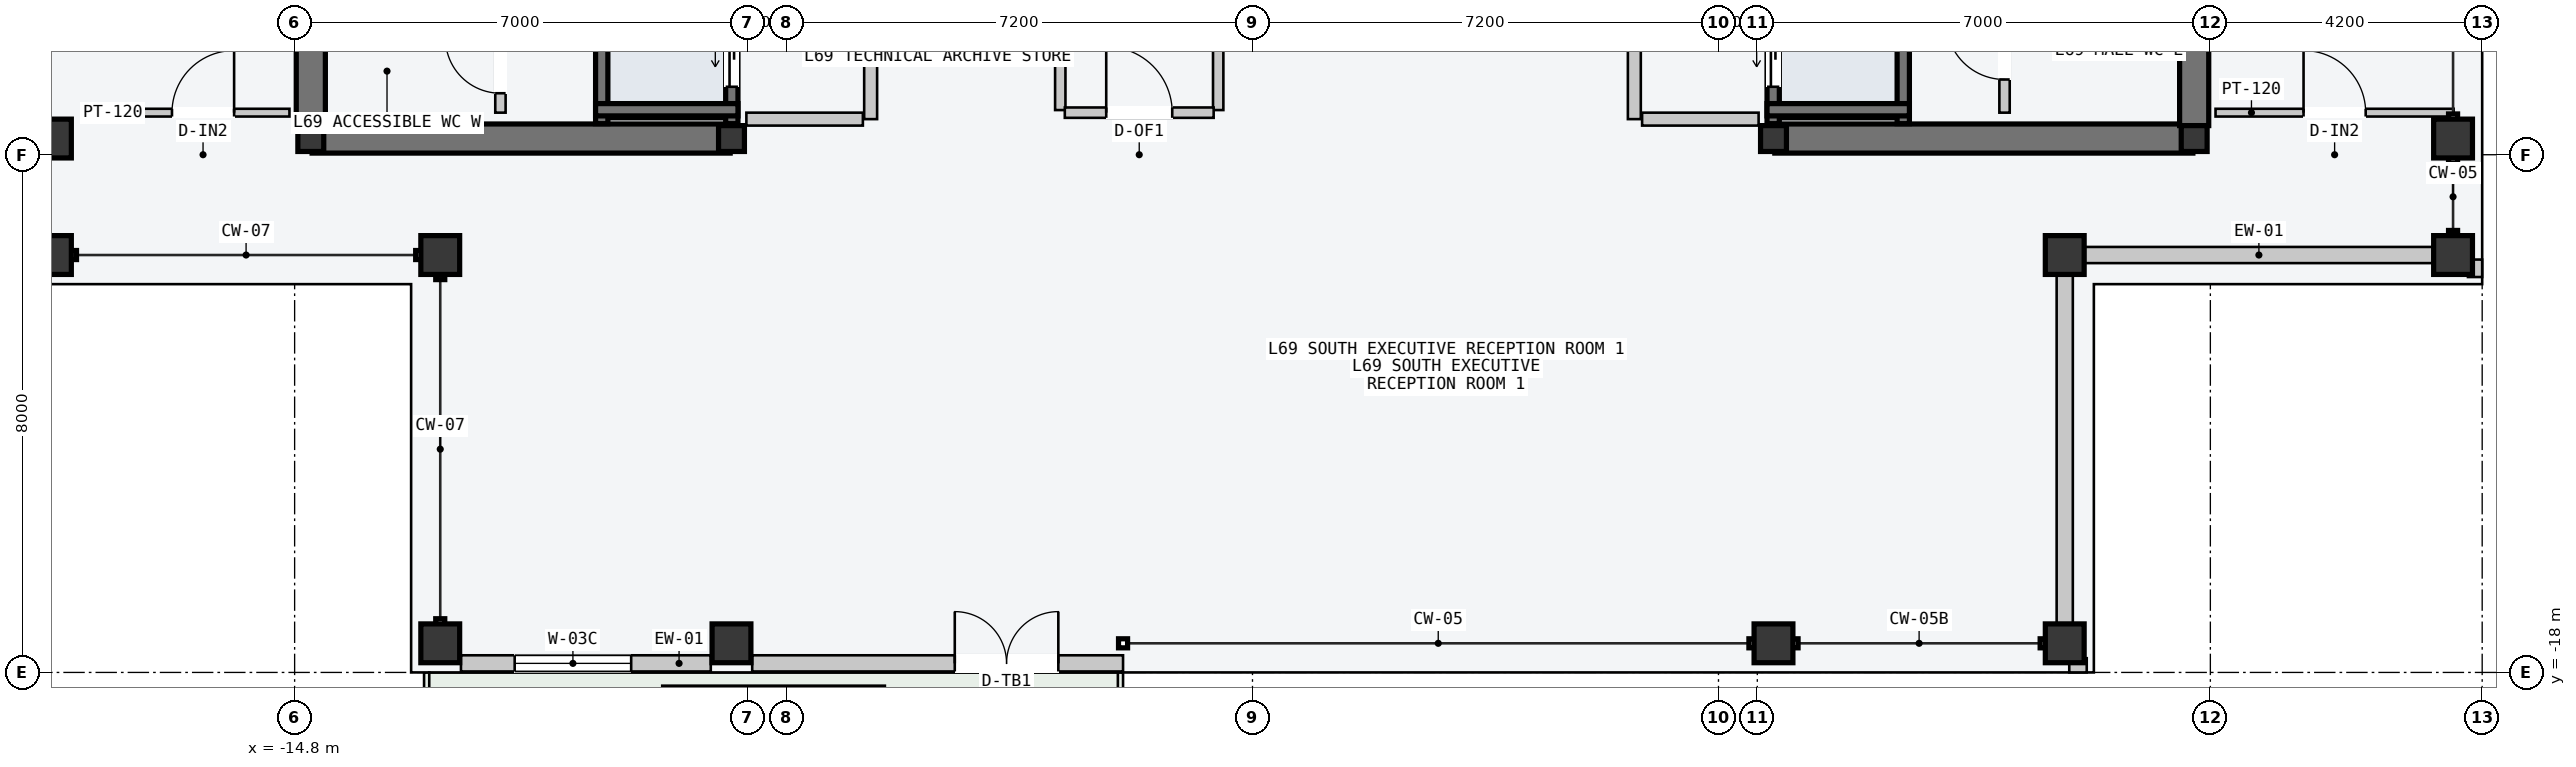
"""IFC4 building model, lengths in metres.
Left out: names, types, materials, properties, quantities, classifications, styles, units other than length and angle.
Written with IfcOpenShell. Run it as: python <this file> out.ifc"""

import sys

from ifc_helpers import new_model, si_unit, direction, frame, frame_2d, origin, origin_2d, place, context, subcontext, project, spatial, rectangle, hollow_rectangle, i_section, extrude, element, fill, save


model = new_model("IFC4")
c1 = context("Model", 3, precision=1e-05, world=origin(), true_north=direction((0.0, 1.0)))
c2 = subcontext(c1, "Body", "Model", "MODEL_VIEW")
j1 = project(units=[si_unit("LENGTHUNIT", "METRE"), si_unit("PLANEANGLEUNIT", "RADIAN")], contexts=[c1])
p1 = place(None, origin())
s1 = spatial("IfcSite", under=j1, at=p1, CompositionType="ELEMENT")
p2 = place(p1, origin())
s2 = spatial("IfcBuilding", under=s1, at=p2, CompositionType="ELEMENT")
p3 = place(p2, frame((0.0, 0.0, 261.6)))
s3 = spatial("IfcBuildingStorey", under=s2, at=p3, CompositionType="ELEMENT", Elevation=261.6)
p4 = place(p3, frame((-14.53, -9.75, -0.2), z_axis=(0.0, 0.0, 1.0), x_axis=(1.0, 0.0, 0.0)))
e1 = element("IfcWall", 1, at=p4, inside=s3, PredefinedType="SHEAR", context=c2, shape_type="SweptSolid", body=[
    extrude(rectangle(XDim=6.46, YDim=0.45, at=frame_2d((3.23, 0.0))), origin(), (0.0, 0.0, 1.0), 3.6),
])
p5 = place(p3, frame((-14.55, -9.55, -0.2), z_axis=(0.0, 0.0, 1.0), x_axis=(0.0, 1.0, 0.0)))
e2 = element("IfcWall", 2, at=p5, inside=s3, PredefinedType="SHEAR", context=c2, shape_type="SweptSolid", body=[
    extrude(rectangle(XDim=9.35, YDim=0.45, at=frame_2d((4.675, 0.0))), origin(), (0.0, 0.0, 1.0), 3.6),
])
p6 = place(p3, frame((8.07, -9.75, -0.2), z_axis=(0.0, 0.0, 1.0), x_axis=(1.0, 0.0, 0.0)))
e3 = element("IfcWall", 3, at=p6, inside=s3, PredefinedType="SHEAR", context=c2, shape_type="SweptSolid", body=[
    extrude(rectangle(XDim=6.46, YDim=0.45, at=frame_2d((3.23, 0.0))), origin(), (0.0, 0.0, 1.0), 3.6),
])
p7 = place(p3, frame((14.55, -9.55, -0.2), z_axis=(0.0, 0.0, 1.0), x_axis=(0.0, 1.0, 0.0)))
e4 = element("IfcWall", 4, at=p7, inside=s3, PredefinedType="SHEAR", context=c2, shape_type="SweptSolid", body=[
    extrude(rectangle(XDim=9.35, YDim=0.45, at=frame_2d((4.675, 0.0))), origin(), (0.0, 0.0, 1.0), 3.6),
])
for number, where, z_axis, x_axis in (
    (5, (-14.55, -9.75, 0.0), (0.0, 0.0, 1.0), (1.0, 0.0, 0.0)),
    (6, (-8.05, -9.75, 0.0), (0.0, 0.0, 1.0), (1.0, 0.0, 0.0)),
    (7, (8.05, -9.75, 0.0), (0.0, 0.0, 1.0), (1.0, 0.0, 0.0)),
    (8, (14.55, -9.75, 0.0), (0.0, 0.0, 1.0), (1.0, 0.0, 0.0)),
):
    element("IfcColumn", number, at=place(p3, frame(where, z_axis=z_axis, x_axis=x_axis)), inside=s3, PredefinedType="COLUMN", context=c2, shape_type="SweptSolid", body=[
        extrude(i_section(OverallWidth=0.4, OverallDepth=0.4, WebThickness=0.013, FlangeThickness=0.021, at=origin_2d()), origin(), (0.0, 0.0, 1.0), 3.6),
    ])
for number, where, z_axis, x_axis in (
    (9, (-12.55, -17.55, 0.0), (0.0, 0.0, 1.0), (1.0, 0.0, 0.0)),
    (10, (-8.05, -17.55, 0.0), (0.0, 0.0, 1.0), (1.0, 0.0, 0.0)),
    (11, (8.05, -17.55, 0.0), (0.0, 0.0, 1.0), (1.0, 0.0, 0.0)),
    (12, (12.55, -17.55, 0.0), (0.0, 0.0, 1.0), (1.0, 0.0, 0.0)),
    (13, (-18.55, -11.55, 0.0), (0.0, 0.0, 1.0), (0.0, 1.0, 0.0)),
    (14, (-18.55, -9.75, 0.0), (0.0, 0.0, 1.0), (0.0, 1.0, 0.0)),
    (15, (18.55, -11.55, 0.0), (0.0, 0.0, 1.0), (0.0, 1.0, 0.0)),
    (16, (18.55, -9.75, 0.0), (0.0, 0.0, 1.0), (0.0, 1.0, 0.0)),
    (17, (12.55, -11.55, 0.0), (0.0, 0.0, 1.0), (1.0, 0.0, 0.0)),
    (18, (-12.55, -11.55, 0.0), (0.0, 0.0, 1.0), (1.0, 0.0, 0.0)),
):
    element("IfcColumn", number, at=place(p3, frame(where, z_axis=z_axis, x_axis=x_axis)), inside=s3, PredefinedType="COLUMN", context=c2, shape_type="SweptSolid", body=[
        extrude(hollow_rectangle(XDim=0.6, YDim=0.6, WallThickness=0.025, at=origin_2d()), origin(), (0.0, 0.0, 1.0), 3.6),
    ])
p8 = place(p3, frame((-12.23, -17.86, 0.0), z_axis=(0.0, 0.0, 1.0), x_axis=(1.0, 0.0, 0.0)))
e19 = element("IfcWall", 19, at=p8, inside=s3, PredefinedType="STANDARD", context=c2, shape_type="SweptSolid", body=[
    extrude(rectangle(XDim=3.86, YDim=0.25, at=frame_2d((1.93, 0.0))), origin(), (0.0, 0.0, 1.0), 3.4),
])
p9 = place(p8, frame((0.83, 0.0, 0.85)))
e20 = element("IfcOpeningElement", 20, at=p9, cuts=e19, PredefinedType="OPENING", context=c2, shape_type="SweptSolid", body=[
    extrude(rectangle(XDim=1.8, YDim=2.05, at=frame_2d((0.9, 1.025))), frame((0.0, 0.135, 0.0), z_axis=(0.0, -1.0, 0.0), x_axis=(1.0, 0.0, 0.0)), (0.0, 0.0, 1.0), 0.27),
])
p10 = place(p3, frame((-7.73, -17.86, 0.0), z_axis=(0.0, 0.0, 1.0), x_axis=(1.0, 0.0, 0.0)))
e21 = element("IfcWall", 21, at=p10, inside=s3, PredefinedType="STANDARD", context=c2, shape_type="SweptSolid", body=[
    extrude(rectangle(XDim=5.73, YDim=0.25, at=frame_2d((2.865, 0.0))), origin(), (0.0, 0.0, 1.0), 3.4),
])
p11 = place(p10, frame((3.13, 0.0, 0.0)))
e22 = element("IfcOpeningElement", 22, at=p11, cuts=e21, PredefinedType="OPENING", context=c2, shape_type="SweptSolid", body=[
    extrude(rectangle(XDim=1.6, YDim=2.2, at=frame_2d((0.8, 1.1))), frame((0.0, 0.135, 0.0), z_axis=(0.0, -1.0, 0.0), x_axis=(1.0, 0.0, 0.0)), (0.0, 0.0, 1.0), 0.27),
])
for number, where, z_axis, x_axis in (
    (23, (12.86, -11.55, 0.0), (0.0, 0.0, 1.0), (1.0, 0.0, 0.0)),
    (24, (12.55, -17.24, 0.0), (0.0, 0.0, 1.0), (0.0, 1.0, 0.0)),
):
    element("IfcWall", number, at=place(p3, frame(where, z_axis=z_axis, x_axis=x_axis)), inside=s3, PredefinedType="STANDARD", context=c2, shape_type="SweptSolid", body=[
        extrude(rectangle(XDim=5.38, YDim=0.25, at=frame_2d((2.69, 0.0))), origin(), (0.0, 0.0, 1.0), 2.85),
    ])
for number, where, z_axis, x_axis in (
    (25, (12.62, -17.89, 0.0), (0.0, 0.0, 1.0), (1.0, 0.0, 0.0)),
    (26, (18.89, -11.89, 0.0), (0.0, 0.0, 1.0), (0.0, 1.0, 0.0)),
):
    element("IfcWall", number, at=place(p3, frame(where, z_axis=z_axis, x_axis=x_axis)), inside=s3, PredefinedType="PARAPET", context=c2, shape_type="SweptSolid", body=[
        extrude(rectangle(XDim=0.27, YDim=0.22, at=frame_2d((0.135, 0.0))), origin(), (0.0, 0.0, 1.0), 1.2),
    ])
p12 = place(p3, frame((-8.045, -9.52, -0.2), z_axis=(0.0, 0.0, 1.0), x_axis=(0.0, 1.0, 0.0)))
e27 = element("IfcWall", 27, at=p12, inside=s3, PredefinedType="SOLIDWALL", context=c2, shape_type="SweptSolid", body=[
    extrude(rectangle(XDim=2.12, YDim=0.19, at=frame_2d((1.06, 0.0))), origin(), (0.0, 0.0, 1.0), 3.6),
])
p13 = place(p12, frame((0.57, 0.0, 0.2)))
e28 = element("IfcOpeningElement", 28, at=p13, cuts=e27, PredefinedType="OPENING", context=c2, shape_type="SweptSolid", body=[
    extrude(rectangle(XDim=1.1, YDim=2.2, at=frame_2d((0.55, 1.1))), frame((0.0, 0.105, 0.0), z_axis=(0.0, -1.0, 0.0), x_axis=(1.0, 0.0, 0.0)), (0.0, 0.0, 1.0), 0.21),
])
p14 = place(p3, frame((-10.055, -9.52, -0.2), z_axis=(0.0, 0.0, 1.0), x_axis=(0.0, 1.0, 0.0)))
e29 = element("IfcWall", 29, at=p14, inside=s3, PredefinedType="SOLIDWALL", context=c2, shape_type="SweptSolid", body=[
    extrude(rectangle(XDim=2.12, YDim=0.19, at=frame_2d((1.06, 0.0))), origin(), (0.0, 0.0, 1.0), 3.6),
])
p15 = place(p3, frame((-10.15, -9.305, -0.2), z_axis=(0.0, 0.0, 1.0), x_axis=(1.0, 0.0, 0.0)))
e30 = element("IfcWall", 30, at=p15, inside=s3, PredefinedType="SOLIDWALL", context=c2, shape_type="SweptSolid", body=[
    extrude(rectangle(XDim=2.2, YDim=0.19, at=frame_2d((1.1, 0.0))), origin(), (0.0, 0.0, 1.0), 3.6),
])
p16 = place(p3, frame((8.045, -9.52, -0.2), z_axis=(0.0, 0.0, 1.0), x_axis=(0.0, 1.0, 0.0)))
e31 = element("IfcWall", 31, at=p16, inside=s3, PredefinedType="SOLIDWALL", context=c2, shape_type="SweptSolid", body=[
    extrude(rectangle(XDim=2.12, YDim=0.19, at=frame_2d((1.06, 0.0))), origin(), (0.0, 0.0, 1.0), 3.6),
])
p17 = place(p16, frame((0.57, 0.0, 0.2)))
e32 = element("IfcOpeningElement", 32, at=p17, cuts=e31, PredefinedType="OPENING", context=c2, shape_type="SweptSolid", body=[
    extrude(rectangle(XDim=1.1, YDim=2.2, at=frame_2d((0.55, 1.1))), frame((0.0, 0.105, 0.0), z_axis=(0.0, -1.0, 0.0), x_axis=(1.0, 0.0, 0.0)), (0.0, 0.0, 1.0), 0.21),
])
p18 = place(p3, frame((10.055, -9.52, -0.2), z_axis=(0.0, 0.0, 1.0), x_axis=(0.0, 1.0, 0.0)))
e33 = element("IfcWall", 33, at=p18, inside=s3, PredefinedType="SOLIDWALL", context=c2, shape_type="SweptSolid", body=[
    extrude(rectangle(XDim=2.12, YDim=0.19, at=frame_2d((1.06, 0.0))), origin(), (0.0, 0.0, 1.0), 3.6),
])
p19 = place(p3, frame((7.95, -9.305, -0.2), z_axis=(0.0, 0.0, 1.0), x_axis=(1.0, 0.0, 0.0)))
e34 = element("IfcWall", 34, at=p19, inside=s3, PredefinedType="SOLIDWALL", context=c2, shape_type="SweptSolid", body=[
    extrude(rectangle(XDim=2.2, YDim=0.19, at=frame_2d((1.1, 0.0))), origin(), (0.0, 0.0, 1.0), 3.6),
])
p20 = place(p3, frame((-5.9, -9.45, 0.0), z_axis=(0.0, 0.0, 1.0), x_axis=(0.0, 1.0, 0.0)))
e35 = element("IfcWall", 35, at=p20, inside=s3, PredefinedType="PARTITIONING", context=c2, shape_type="SweptSolid", body=[
    extrude(rectangle(XDim=10.5, YDim=0.2, at=frame_2d((5.25, 0.0))), origin(), (0.0, 0.0, 1.0), 3.4),
])
p21 = place(p20, frame((3.9, 0.0, 0.0)))
e36 = element("IfcOpeningElement", 36, at=p21, cuts=e35, PredefinedType="OPENING", context=c2, shape_type="SweptSolid", body=[
    extrude(rectangle(XDim=1.5, YDim=2.2, at=frame_2d((0.75, 1.1))), frame((0.0, 0.11, 0.0), z_axis=(0.0, -1.0, 0.0), x_axis=(1.0, 0.0, 0.0)), (0.0, 0.0, 1.0), 0.22),
])
p22 = place(p3, frame((-6.02, -9.45, 0.0), z_axis=(0.0, 0.0, 1.0), x_axis=(-1.0, 0.0, 0.0)))
e37 = element("IfcWall", 37, at=p22, inside=s3, PredefinedType="PARTITIONING", context=c2, shape_type="SweptSolid", body=[
    extrude(rectangle(XDim=1.8, YDim=0.2, at=frame_2d((0.9, 0.0))), origin(), (0.0, 0.0, 1.0), 3.4),
])
p23 = place(p3, frame((-11.62, -9.35, 0.0), z_axis=(0.0, 0.0, 1.0), x_axis=(0.0, 1.0, 0.0)))
e38 = element("IfcWall", 38, at=p23, inside=s3, PredefinedType="PARTITIONING", context=c2, shape_type="SweptSolid", body=[
    extrude(rectangle(XDim=3.85, YDim=0.16, at=frame_2d((1.925, 0.0))), origin(), (0.0, 0.0, 1.0), 3.4),
])
p24 = place(p23, frame((0.3, 0.0, 0.0)))
e39 = element("IfcOpeningElement", 39, at=p24, cuts=e38, PredefinedType="OPENING", context=c2, shape_type="SweptSolid", body=[
    extrude(rectangle(XDim=0.85, YDim=2.12, at=frame_2d((0.425, 1.06))), frame((0.0, 0.09, 0.0), z_axis=(0.0, -1.0, 0.0), x_axis=(1.0, 0.0, 0.0)), (0.0, 0.0, 1.0), 0.18),
])
p25 = place(p23, frame((1.5, 0.0, 0.0)))
e40 = element("IfcOpeningElement", 40, at=p25, cuts=e38, PredefinedType="OPENING", context=c2, shape_type="SweptSolid", body=[
    extrude(rectangle(XDim=0.85, YDim=2.12, at=frame_2d((0.425, 1.06))), frame((0.0, 0.09, 0.0), z_axis=(0.0, -1.0, 0.0), x_axis=(1.0, 0.0, 0.0)), (0.0, 0.0, 1.0), 0.18),
])
p26 = place(p23, frame((2.7, 0.0, 0.0)))
e41 = element("IfcOpeningElement", 41, at=p26, cuts=e38, PredefinedType="OPENING", context=c2, shape_type="SweptSolid", body=[
    extrude(rectangle(XDim=0.85, YDim=2.12, at=frame_2d((0.425, 1.06))), frame((0.0, 0.09, 0.0), z_axis=(0.0, -1.0, 0.0), x_axis=(1.0, 0.0, 0.0)), (0.0, 0.0, 1.0), 0.18),
])
p27 = place(p3, frame((5.9, -9.45, 0.0), z_axis=(0.0, 0.0, 1.0), x_axis=(0.0, 1.0, 0.0)))
e42 = element("IfcWall", 42, at=p27, inside=s3, PredefinedType="PARTITIONING", context=c2, shape_type="SweptSolid", body=[
    extrude(rectangle(XDim=10.5, YDim=0.2, at=frame_2d((5.25, 0.0))), origin(), (0.0, 0.0, 1.0), 3.4),
])
p28 = place(p27, frame((3.9, 0.0, 0.0)))
e43 = element("IfcOpeningElement", 43, at=p28, cuts=e42, PredefinedType="OPENING", context=c2, shape_type="SweptSolid", body=[
    extrude(rectangle(XDim=1.5, YDim=2.2, at=frame_2d((0.75, 1.1))), frame((0.0, 0.11, 0.0), z_axis=(0.0, -1.0, 0.0), x_axis=(1.0, 0.0, 0.0)), (0.0, 0.0, 1.0), 0.22),
])
p29 = place(p3, frame((6.02, -9.45, 0.0), z_axis=(0.0, 0.0, 1.0), x_axis=(1.0, 0.0, 0.0)))
e44 = element("IfcWall", 44, at=p29, inside=s3, PredefinedType="PARTITIONING", context=c2, shape_type="SweptSolid", body=[
    extrude(rectangle(XDim=1.8, YDim=0.2, at=frame_2d((0.9, 0.0))), origin(), (0.0, 0.0, 1.0), 3.4),
])
p30 = place(p3, frame((11.62, -9.35, 0.0), z_axis=(0.0, 0.0, 1.0), x_axis=(0.0, 1.0, 0.0)))
e45 = element("IfcWall", 45, at=p30, inside=s3, PredefinedType="PARTITIONING", context=c2, shape_type="SweptSolid", body=[
    extrude(rectangle(XDim=3.85, YDim=0.16, at=frame_2d((1.925, 0.0))), origin(), (0.0, 0.0, 1.0), 3.4),
])
p31 = place(p30, frame((0.512, 0.0, 0.0)))
e46 = element("IfcOpeningElement", 46, at=p31, cuts=e45, PredefinedType="OPENING", context=c2, shape_type="SweptSolid", body=[
    extrude(rectangle(XDim=0.9, YDim=2.15, at=frame_2d((0.45, 1.075))), frame((0.0, 0.09, 0.0), z_axis=(0.0, -1.0, 0.0), x_axis=(1.0, 0.0, 0.0)), (0.0, 0.0, 1.0), 0.18),
])
p32 = place(p30, frame((2.438, 0.0, 0.0)))
e47 = element("IfcOpeningElement", 47, at=p32, cuts=e45, PredefinedType="OPENING", context=c2, shape_type="SweptSolid", body=[
    extrude(rectangle(XDim=0.9, YDim=2.15, at=frame_2d((0.45, 1.075))), frame((0.0, 0.09, 0.0), z_axis=(0.0, -1.0, 0.0), x_axis=(1.0, 0.0, 0.0)), (0.0, 0.0, 1.0), 0.18),
])
p33 = place(p3, frame((-2.97, -9.31, 0.0), z_axis=(0.0, 0.0, 1.0), x_axis=(0.0, 1.0, 0.0)))
e48 = element("IfcWall", 48, at=p33, inside=s3, PredefinedType="PARTITIONING", context=c2, shape_type="SweptSolid", body=[
    extrude(rectangle(XDim=3.63, YDim=0.16, at=frame_2d((1.815, 0.0))), origin(), (0.0, 0.0, 1.0), 3.4),
])
p34 = place(p33, frame((1.15, 0.0, 0.0)))
e49 = element("IfcOpeningElement", 49, at=p34, cuts=e48, PredefinedType="OPENING", context=c2, shape_type="SweptSolid", body=[
    extrude(rectangle(XDim=0.96, YDim=2.18, at=frame_2d((0.48, 1.09))), frame((0.0, 0.09, 0.0), z_axis=(0.0, -1.0, 0.0), x_axis=(1.0, 0.0, 0.0)), (0.0, 0.0, 1.0), 0.18),
])
p35 = place(p3, frame((-0.53, -9.31, 0.0), z_axis=(0.0, 0.0, 1.0), x_axis=(0.0, 1.0, 0.0)))
e50 = element("IfcWall", 50, at=p35, inside=s3, PredefinedType="PARTITIONING", context=c2, shape_type="SweptSolid", body=[
    extrude(rectangle(XDim=3.63, YDim=0.16, at=frame_2d((1.815, 0.0))), origin(), (0.0, 0.0, 1.0), 3.4),
])
p36 = place(p35, frame((1.15, 0.0, 0.0)))
e51 = element("IfcOpeningElement", 51, at=p36, cuts=e50, PredefinedType="OPENING", context=c2, shape_type="SweptSolid", body=[
    extrude(rectangle(XDim=0.96, YDim=2.18, at=frame_2d((0.48, 1.09))), frame((0.0, 0.09, 0.0), z_axis=(0.0, -1.0, 0.0), x_axis=(1.0, 0.0, 0.0)), (0.0, 0.0, 1.0), 0.18),
])
p37 = place(p3, frame((-2.9, -9.35, 0.0), z_axis=(0.0, 0.0, 1.0), x_axis=(1.0, 0.0, 0.0)))
e52 = element("IfcWall", 52, at=p37, inside=s3, PredefinedType="PARTITIONING", context=c2, shape_type="SweptSolid", body=[
    extrude(rectangle(XDim=2.3, YDim=0.16, at=frame_2d((1.15, 0.0))), origin(), (0.0, 0.0, 1.0), 3.4),
])
p38 = place(p37, frame((0.64, 0.0, 0.0)))
e53 = element("IfcOpeningElement", 53, at=p38, cuts=e52, PredefinedType="OPENING", context=c2, shape_type="SweptSolid", body=[
    extrude(rectangle(XDim=1.02, YDim=2.2, at=frame_2d((0.51, 1.1))), frame((0.0, 0.09, 0.0), z_axis=(0.0, -1.0, 0.0), x_axis=(1.0, 0.0, 0.0)), (0.0, 0.0, 1.0), 0.18),
])
p39 = place(p3, frame((-17.55, -9.35, 0.0), z_axis=(0.0, 0.0, 1.0), x_axis=(1.0, 0.0, 0.0)))
e54 = element("IfcWall", 54, at=p39, inside=s3, PredefinedType="PARTITIONING", context=c2, shape_type="SweptSolid", body=[
    extrude(rectangle(XDim=2.67, YDim=0.12, at=frame_2d((1.335, 0.0))), origin(), (0.0, 0.0, 1.0), 3.4),
])
p40 = place(p39, frame((0.855, 0.0, 0.0)))
e55 = element("IfcOpeningElement", 55, at=p40, cuts=e54, PredefinedType="OPENING", context=c2, shape_type="SweptSolid", body=[
    extrude(rectangle(XDim=0.96, YDim=2.18, at=frame_2d((0.48, 1.09))), frame((0.0, 0.07, 0.0), z_axis=(0.0, -1.0, 0.0), x_axis=(1.0, 0.0, 0.0)), (0.0, 0.0, 1.0), 0.14),
])
p41 = place(p3, frame((14.88, -9.35, 0.0), z_axis=(0.0, 0.0, 1.0), x_axis=(1.0, 0.0, 0.0)))
e56 = element("IfcWall", 56, at=p41, inside=s3, PredefinedType="PARTITIONING", context=c2, shape_type="SweptSolid", body=[
    extrude(rectangle(XDim=3.68, YDim=0.12, at=frame_2d((1.84, 0.0))), origin(), (0.0, 0.0, 1.0), 3.4),
])
p42 = place(p41, frame((1.36, 0.0, 0.0)))
e57 = element("IfcOpeningElement", 57, at=p42, cuts=e56, PredefinedType="OPENING", context=c2, shape_type="SweptSolid", body=[
    extrude(rectangle(XDim=0.96, YDim=2.18, at=frame_2d((0.48, 1.09))), frame((0.0, 0.07, 0.0), z_axis=(0.0, -1.0, 0.0), x_axis=(1.0, 0.0, 0.0)), (0.0, 0.0, 1.0), 0.14),
])
p43 = place(p9, origin())
e58 = element("IfcWindow", 58, at=p43, inside=s3, PartitioningType="SINGLE_PANEL", PredefinedType="WINDOW", context=c2, shape_type="SweptSolid", body=[
    extrude(rectangle(XDim=1.8, YDim=2.05, at=frame_2d((0.9, 1.025))), frame((0.0, 0.03, 0.0), z_axis=(0.0, -1.0, 0.0), x_axis=(1.0, 0.0, 0.0)), (0.0, 0.0, 1.0), 0.06),
])
fill(e20, e58)
p44 = place(p11, origin())
e59 = element("IfcDoor", 59, at=p44, inside=s3, OperationType="DOUBLE_DOOR_SINGLE_SWING", PredefinedType="DOOR", context=c2, shape_type="SweptSolid", body=[
    extrude(rectangle(XDim=1.6, YDim=2.2, at=frame_2d((0.8, 1.1))), frame((0.0, 0.025, 0.0), z_axis=(0.0, -1.0, 0.0), x_axis=(1.0, 0.0, 0.0)), (0.0, 0.0, 1.0), 0.05),
])
fill(e22, e59)
p45 = place(p13, origin())
e60 = element("IfcDoor", 60, at=p45, inside=s3, OperationType="SLIDING_TO_LEFT", PredefinedType="DOOR", context=c2, shape_type="SweptSolid", body=[
    extrude(rectangle(XDim=1.1, YDim=2.2, at=frame_2d((0.55, 1.1))), frame((0.0, 0.025, 0.0), z_axis=(0.0, -1.0, 0.0), x_axis=(1.0, 0.0, 0.0)), (0.0, 0.0, 1.0), 0.05),
])
fill(e28, e60)
p46 = place(p17, origin())
e61 = element("IfcDoor", 61, at=p46, inside=s3, OperationType="SLIDING_TO_LEFT", PredefinedType="DOOR", context=c2, shape_type="SweptSolid", body=[
    extrude(rectangle(XDim=1.1, YDim=2.2, at=frame_2d((0.55, 1.1))), frame((0.0, 0.025, 0.0), z_axis=(0.0, -1.0, 0.0), x_axis=(1.0, 0.0, 0.0)), (0.0, 0.0, 1.0), 0.05),
])
fill(e32, e61)
p47 = place(p24, origin())
e62 = element("IfcDoor", 62, at=p47, inside=s3, OperationType="SINGLE_SWING_RIGHT", PredefinedType="DOOR", context=c2, shape_type="SweptSolid", body=[
    extrude(rectangle(XDim=0.85, YDim=2.12, at=frame_2d((0.425, 1.06))), frame((0.0, 0.025, 0.0), z_axis=(0.0, -1.0, 0.0), x_axis=(1.0, 0.0, 0.0)), (0.0, 0.0, 1.0), 0.05),
])
fill(e39, e62)
p48 = place(p31, origin())
e63 = element("IfcDoor", 63, at=p48, inside=s3, OperationType="SINGLE_SWING_RIGHT", PredefinedType="DOOR", context=c2, shape_type="SweptSolid", body=[
    extrude(rectangle(XDim=0.9, YDim=2.15, at=frame_2d((0.45, 1.075))), frame((0.0, 0.025, 0.0), z_axis=(0.0, -1.0, 0.0), x_axis=(1.0, 0.0, 0.0)), (0.0, 0.0, 1.0), 0.05),
])
fill(e46, e63)
p49 = place(p38, origin())
e64 = element("IfcDoor", 64, at=p49, inside=s3, OperationType="SINGLE_SWING_LEFT", PredefinedType="DOOR", context=c2, shape_type="SweptSolid", body=[
    extrude(rectangle(XDim=1.02, YDim=2.2, at=frame_2d((0.51, 1.1))), frame((0.0, 0.025, 0.0), z_axis=(0.0, -1.0, 0.0), x_axis=(1.0, 0.0, 0.0)), (0.0, 0.0, 1.0), 0.05),
])
fill(e53, e64)
p50 = place(p40, origin())
e65 = element("IfcDoor", 65, at=p50, inside=s3, OperationType="SINGLE_SWING_RIGHT", PredefinedType="DOOR", context=c2, shape_type="SweptSolid", body=[
    extrude(rectangle(XDim=0.96, YDim=2.18, at=frame_2d((0.48, 1.09))), frame((0.0, 0.025, 0.0), z_axis=(0.0, -1.0, 0.0), x_axis=(1.0, 0.0, 0.0)), (0.0, 0.0, 1.0), 0.05),
])
fill(e55, e65)
p51 = place(p42, origin())
e66 = element("IfcDoor", 66, at=p51, inside=s3, OperationType="SINGLE_SWING_LEFT", PredefinedType="DOOR", context=c2, shape_type="SweptSolid", body=[
    extrude(rectangle(XDim=0.96, YDim=2.18, at=frame_2d((0.48, 1.09))), frame((0.0, 0.025, 0.0), z_axis=(0.0, -1.0, 0.0), x_axis=(1.0, 0.0, 0.0)), (0.0, 0.0, 1.0), 0.05),
])
fill(e57, e66)
save(model, sys.argv[1])
